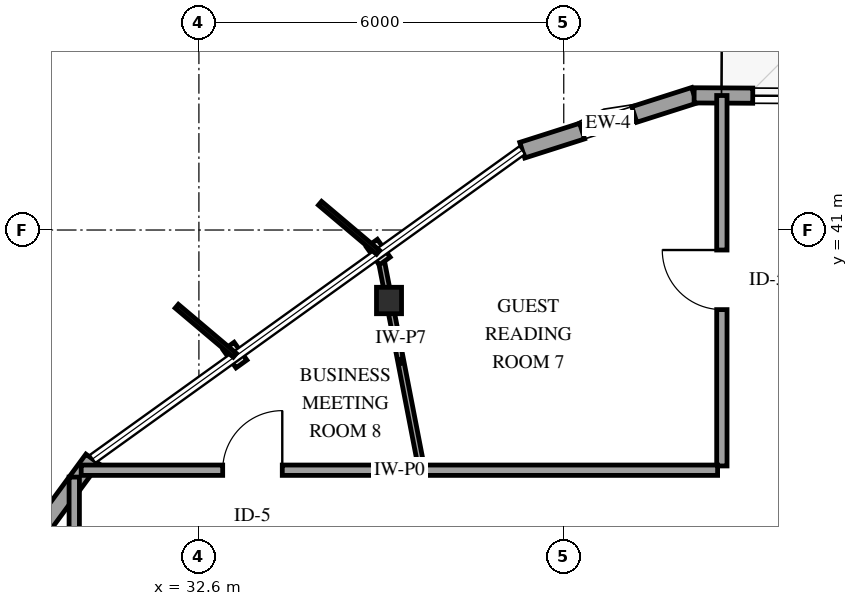
"""IFC4 building model, lengths in metres.
Left out: names, types, materials, properties, quantities, classifications, styles, units other than length and angle.
Written with IfcOpenShell. Run it as: python <this file> out.ifc"""

import sys

from ifc_helpers import new_model, si_unit, direction, frame, frame_2d, origin, origin_2d, place, context, subcontext, project, spatial, rectangle, i_section, extrude, element, fill, save


model = new_model("IFC4")
c1 = context("Model", 3, precision=1e-05, world=origin(), true_north=direction((0.0, 1.0)))
c2 = subcontext(c1, "Body", "Model", "MODEL_VIEW")
j1 = project(units=[si_unit("LENGTHUNIT", "METRE"), si_unit("PLANEANGLEUNIT", "RADIAN")], contexts=[c1])
p1 = place(None, origin())
s1 = spatial("IfcSite", under=j1, at=p1, CompositionType="ELEMENT")
p2 = place(p1, origin())
s2 = spatial("IfcBuilding", under=s1, at=p2, CompositionType="ELEMENT")
p3 = place(p2, frame((0.0, 0.0, 164.2)))
s3 = spatial("IfcBuildingStorey", under=s2, at=p3, CompositionType="ELEMENT", Elevation=164.2)
p4 = place(p3, frame((35.726, 39.841, 0.0), z_axis=(0.0, 0.0, 1.0), x_axis=(1.0, 0.0, 0.0)))
e1 = element("IfcColumn", 1, at=p4, inside=s3, PredefinedType="COLUMN", context=c2, shape_type="SweptSolid", body=[
    extrude(i_section(OverallWidth=0.412, OverallDepth=0.435, WebThickness=0.036, FlangeThickness=0.057, FilletRadius=0.038, at=origin_2d()), origin(), (0.0, 0.0, 1.0), 3.6),
])
p5 = place(p3, frame((40.744, 43.215, 0.0), z_axis=(0.0, 0.0, 1.0), x_axis=(-0.95267036835, -0.304005212568, 0.0)))
e2 = element("IfcWall", 2, at=p5, inside=s3, PredefinedType="SOLIDWALL", context=c2, shape_type="SweptSolid", body=[
    extrude(rectangle(XDim=2.967, YDim=0.27, at=frame_2d((1.483, 0.0))), origin(), (0.0, 0.0, 1.0), 2.679),
])
p6 = place(p5, frame((1.033, 0.0, 0.75)))
e3 = element("IfcOpeningElement", 3, at=p6, cuts=e2, PredefinedType="OPENING", context=c2, shape_type="SweptSolid", body=[
    extrude(rectangle(XDim=0.9, YDim=1.5, at=frame_2d((0.45, 0.75))), frame((0.0, 0.145, 0.0), z_axis=(0.0, -1.0, 0.0), x_axis=(1.0, 0.0, 0.0)), (0.0, 0.0, 1.0), 0.29),
])
p7 = place(p3, frame((49.447, 43.169, 0.0), z_axis=(0.0, 0.0, 1.0), x_axis=(-0.999986386637, 0.005217905737, 0.0)))
e4 = element("IfcWall", 4, at=p7, inside=s3, PredefinedType="SOLIDWALL", context=c2, shape_type="SweptSolid", body=[
    extrude(rectangle(XDim=8.703, YDim=0.25, at=frame_2d((4.351, 0.0))), origin(), (0.0, 0.0, 1.0), 2.679),
])
p8 = place(p7, frame((3.851, 0.0, 0.0)))
e5 = element("IfcOpeningElement", 5, at=p8, cuts=e4, PredefinedType="OPENING", context=c2, shape_type="SweptSolid", body=[
    extrude(rectangle(XDim=1.0, YDim=2.15, at=frame_2d((0.5, 1.075))), frame((0.0, 0.135, 0.0), z_axis=(0.0, -1.0, 0.0), x_axis=(1.0, 0.0, 0.0)), (0.0, 0.0, 1.0), 0.27),
])
p9 = place(p7, frame((0.44, 0.0, 0.72)))
e6 = element("IfcOpeningElement", 6, at=p9, cuts=e4, PredefinedType="OPENING", context=c2, shape_type="SweptSolid", body=[
    extrude(rectangle(XDim=1.2, YDim=1.6, at=frame_2d((0.6, 0.8))), frame((0.0, 0.135, 0.0), z_axis=(0.0, -1.0, 0.0), x_axis=(1.0, 0.0, 0.0)), (0.0, 0.0, 1.0), 0.27),
])
p10 = place(p7, frame((6.539, 0.0, 0.72)))
e7 = element("IfcOpeningElement", 7, at=p10, cuts=e4, PredefinedType="OPENING", context=c2, shape_type="SweptSolid", body=[
    extrude(rectangle(XDim=1.2, YDim=1.6, at=frame_2d((0.6, 0.8))), frame((0.0, 0.135, 0.0), z_axis=(0.0, -1.0, 0.0), x_axis=(1.0, 0.0, 0.0)), (0.0, 0.0, 1.0), 0.27),
])
p11 = place(p3, frame((30.851, 37.234, 0.0), z_axis=(0.0, 0.0, 1.0), x_axis=(-0.592030622016, -0.805915468641, 0.0)))
e8 = element("IfcWall", 8, at=p11, inside=s3, PredefinedType="SOLIDWALL", context=c2, shape_type="SweptSolid", body=[
    extrude(rectangle(XDim=2.967, YDim=0.27, at=frame_2d((1.483, 0.0))), origin(), (0.0, 0.0, 1.0), 2.679),
])
p12 = place(p3, frame((30.55, 30.37, 0.0), z_axis=(0.0, 0.0, 1.0), x_axis=(0.0, 1.0, 0.0)))
e9 = element("IfcWall", 9, at=p12, inside=s3, PredefinedType="PARTITIONING", context=c2, shape_type="SweptSolid", body=[
    extrude(rectangle(XDim=6.567, YDim=0.17, at=frame_2d((3.283, 0.0))), origin(), (0.0, 0.0, 1.0), 3.3),
])
p13 = place(p12, frame((2.808, 0.0, 0.0)))
e10 = element("IfcOpeningElement", 10, at=p13, cuts=e9, PredefinedType="OPENING", context=c2, shape_type="SweptSolid", body=[
    extrude(rectangle(XDim=0.98, YDim=2.15, at=frame_2d((0.49, 1.075))), frame((0.0, 0.095, 0.0), z_axis=(0.0, -1.0, 0.0), x_axis=(1.0, 0.0, 0.0)), (0.0, 0.0, 1.0), 0.19),
])
p14 = place(p3, frame((41.2, 37.12, 0.0), z_axis=(0.0, 0.0, 1.0), x_axis=(0.0, 1.0, 0.0)))
e11 = element("IfcWall", 11, at=p14, inside=s3, PredefinedType="PARTITIONING", context=c2, shape_type="SweptSolid", body=[
    extrude(rectangle(XDim=6.092, YDim=0.17, at=frame_2d((3.046, 0.0))), origin(), (0.0, 0.0, 1.0), 3.3),
])
p15 = place(p14, frame((2.571, 0.0, 0.0)))
e12 = element("IfcOpeningElement", 12, at=p15, cuts=e11, PredefinedType="OPENING", context=c2, shape_type="SweptSolid", body=[
    extrude(rectangle(XDim=0.98, YDim=2.15, at=frame_2d((0.49, 1.075))), frame((0.0, 0.095, 0.0), z_axis=(0.0, -1.0, 0.0), x_axis=(1.0, 0.0, 0.0)), (0.0, 0.0, 1.0), 0.19),
])
p16 = place(p3, frame((30.664, 37.05, 0.0), z_axis=(0.0, 0.0, 1.0), x_axis=(1.0, 0.0, 0.0)))
e13 = element("IfcWall", 13, at=p16, inside=s3, PredefinedType="PARTITIONING", context=c2, shape_type="SweptSolid", body=[
    extrude(rectangle(XDim=5.603, YDim=0.17, at=frame_2d((2.802, 0.0))), origin(), (0.0, 0.0, 1.0), 3.3),
])
p17 = place(p16, frame((2.327, 0.0, 0.0)))
e14 = element("IfcOpeningElement", 14, at=p17, cuts=e13, PredefinedType="OPENING", context=c2, shape_type="SweptSolid", body=[
    extrude(rectangle(XDim=0.98, YDim=2.15, at=frame_2d((0.49, 1.075))), frame((0.0, 0.095, 0.0), z_axis=(0.0, -1.0, 0.0), x_axis=(1.0, 0.0, 0.0)), (0.0, 0.0, 1.0), 0.19),
])
p18 = place(p3, frame((36.267, 37.05, 0.0), z_axis=(0.0, 0.0, 1.0), x_axis=(1.0, 0.0, 0.0)))
e15 = element("IfcWall", 15, at=p18, inside=s3, PredefinedType="PARTITIONING", context=c2, shape_type="SweptSolid", body=[
    extrude(rectangle(XDim=4.863, YDim=0.17, at=frame_2d((2.431, 0.0))), origin(), (0.0, 0.0, 1.0), 3.3),
])
p19 = place(p3, frame((36.267, 37.05, 0.0), z_axis=(0.0, 0.0, 1.0), x_axis=(-0.19013643789, 0.981757676306, 0.0)))
e16 = element("IfcWall", 16, at=p19, inside=s3, PredefinedType="PARTITIONING", context=c2, shape_type="SweptSolid", body=[
    extrude(rectangle(XDim=3.645, YDim=0.1, at=frame_2d((1.823, 0.0))), origin(), (0.0, 0.0, 1.0), 2.595),
])
p20 = place(p6, origin())
e17 = element("IfcWindow", 17, at=p20, inside=s3, PartitioningType="SINGLE_PANEL", PredefinedType="WINDOW", context=c2, shape_type="SweptSolid", body=[
    extrude(rectangle(XDim=0.9, YDim=1.5, at=frame_2d((0.45, 0.75))), frame((0.0, 0.03, 0.0), z_axis=(0.0, -1.0, 0.0), x_axis=(1.0, 0.0, 0.0)), (0.0, 0.0, 1.0), 0.06),
])
fill(e3, e17)
p21 = place(p10, origin())
e18 = element("IfcWindow", 18, at=p21, inside=s3, PartitioningType="SINGLE_PANEL", PredefinedType="WINDOW", context=c2, shape_type="SweptSolid", body=[
    extrude(rectangle(XDim=1.2, YDim=1.6, at=frame_2d((0.6, 0.8))), frame((0.0, 0.03, 0.0), z_axis=(0.0, -1.0, 0.0), x_axis=(1.0, 0.0, 0.0)), (0.0, 0.0, 1.0), 0.06),
])
fill(e7, e18)
p22 = place(p15, origin())
e19 = element("IfcDoor", 19, at=p22, inside=s3, OperationType="SINGLE_SWING_RIGHT", PredefinedType="DOOR", context=c2, shape_type="SweptSolid", body=[
    extrude(rectangle(XDim=0.98, YDim=2.15, at=frame_2d((0.49, 1.075))), frame((0.0, 0.025, 0.0), z_axis=(0.0, -1.0, 0.0), x_axis=(1.0, 0.0, 0.0)), (0.0, 0.0, 1.0), 0.05),
])
fill(e12, e19)
p23 = place(p17, origin())
e20 = element("IfcDoor", 20, at=p23, inside=s3, OperationType="SINGLE_SWING_RIGHT", PredefinedType="DOOR", context=c2, shape_type="SweptSolid", body=[
    extrude(rectangle(XDim=0.98, YDim=2.15, at=frame_2d((0.49, 1.075))), frame((0.0, 0.025, 0.0), z_axis=(0.0, -1.0, 0.0), x_axis=(1.0, 0.0, 0.0)), (0.0, 0.0, 1.0), 0.05),
])
fill(e14, e20)
save(model, sys.argv[1])
